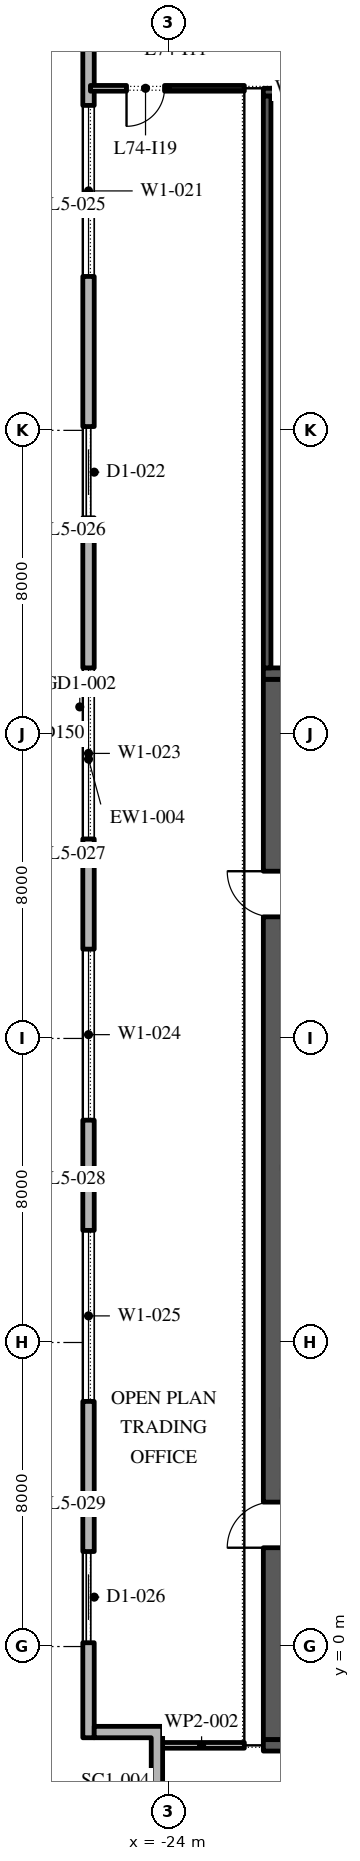
"""IFC4 building model, lengths in metres.
Left out: names, types, materials, properties, quantities, classifications, styles, units other than length and angle.
Written with IfcOpenShell. Run it as: python <this file> out.ifc"""

import sys

from ifc_helpers import new_model, si_unit, direction, frame, frame_2d, origin, place, context, subcontext, project, spatial, polyline, rectangle, outline, extrude, element, fill, save


model = new_model("IFC4")
c1 = context("Model", 3, precision=1e-05, world=origin(), true_north=direction((0.0, 1.0)))
c2 = subcontext(c1, "Body", "Model", "MODEL_VIEW")
j1 = project(units=[si_unit("LENGTHUNIT", "METRE"), si_unit("PLANEANGLEUNIT", "RADIAN")], contexts=[c1])
p1 = place(None, origin())
s1 = spatial("IfcSite", under=j1, at=p1, CompositionType="ELEMENT")
p2 = place(p1, origin())
s2 = spatial("IfcBuilding", under=s1, at=p2, CompositionType="ELEMENT")
p3 = place(p2, frame((0.0, 0.0, 338.4)))
s3 = spatial("IfcBuildingStorey", under=s2, at=p3, CompositionType="ELEMENT", Elevation=338.4)
p4 = place(p3, frame((-26.1, 49.1, 0.0), z_axis=(0.0, 0.0, 1.0), x_axis=(0.0, -1.0, 0.0)))
e1 = element("IfcWall", 1, at=p4, inside=s3, PredefinedType="STANDARD", context=c2, shape_type="SweptSolid", body=[
    extrude(rectangle(XDim=51.5, YDim=0.3, at=frame_2d((25.75, 0.0))), origin(), (0.0, 0.0, 1.0), 4.0),
])
p5 = place(p4, frame((1.3, 0.0, 0.45)))
e2 = element("IfcOpeningElement", 2, at=p5, cuts=e1, PredefinedType="OPENING", context=c2, shape_type="SweptSolid", body=[
    extrude(rectangle(XDim=4.5, YDim=3.05, at=frame_2d((2.25, 1.525))), frame((0.0, 0.16, 0.0), z_axis=(0.0, -1.0, 0.0), x_axis=(1.0, 0.0, 0.0)), (0.0, 0.0, 1.0), 0.32),
])
p6 = place(p4, frame((8.55, 0.0, 0.45)))
e3 = element("IfcOpeningElement", 3, at=p6, cuts=e1, PredefinedType="OPENING", context=c2, shape_type="SweptSolid", body=[
    extrude(rectangle(XDim=4.5, YDim=3.05, at=frame_2d((2.25, 1.525))), frame((0.0, 0.16, 0.0), z_axis=(0.0, -1.0, 0.0), x_axis=(1.0, 0.0, 0.0)), (0.0, 0.0, 1.0), 0.32),
])
p7 = place(p4, frame((17.0, 0.0, 0.0)))
e4 = element("IfcOpeningElement", 4, at=p7, cuts=e1, PredefinedType="OPENING", context=c2, shape_type="SweptSolid", body=[
    extrude(rectangle(XDim=2.4, YDim=3.5, at=frame_2d((1.2, 1.75))), frame((0.0, 0.16, 0.0), z_axis=(0.0, -1.0, 0.0), x_axis=(1.0, 0.0, 0.0)), (0.0, 0.0, 1.0), 0.32),
])
p8 = place(p4, frame((23.35, 0.0, 0.45)))
e5 = element("IfcOpeningElement", 5, at=p8, cuts=e1, PredefinedType="OPENING", context=c2, shape_type="SweptSolid", body=[
    extrude(rectangle(XDim=4.5, YDim=3.05, at=frame_2d((2.25, 1.525))), frame((0.0, 0.16, 0.0), z_axis=(0.0, -1.0, 0.0), x_axis=(1.0, 0.0, 0.0)), (0.0, 0.0, 1.0), 0.32),
])
p9 = place(p4, frame((30.75, 0.0, 0.45)))
e6 = element("IfcOpeningElement", 6, at=p9, cuts=e1, PredefinedType="OPENING", context=c2, shape_type="SweptSolid", body=[
    extrude(rectangle(XDim=4.5, YDim=3.05, at=frame_2d((2.25, 1.525))), frame((0.0, 0.16, 0.0), z_axis=(0.0, -1.0, 0.0), x_axis=(1.0, 0.0, 0.0)), (0.0, 0.0, 1.0), 0.32),
])
p10 = place(p4, frame((38.15, 0.0, 0.45)))
e7 = element("IfcOpeningElement", 7, at=p10, cuts=e1, PredefinedType="OPENING", context=c2, shape_type="SweptSolid", body=[
    extrude(rectangle(XDim=4.5, YDim=3.05, at=frame_2d((2.25, 1.525))), frame((0.0, 0.16, 0.0), z_axis=(0.0, -1.0, 0.0), x_axis=(1.0, 0.0, 0.0)), (0.0, 0.0, 1.0), 0.32),
])
p11 = place(p4, frame((46.6, 0.0, 0.0)))
e8 = element("IfcOpeningElement", 8, at=p11, cuts=e1, PredefinedType="OPENING", context=c2, shape_type="SweptSolid", body=[
    extrude(rectangle(XDim=2.4, YDim=3.5, at=frame_2d((1.2, 1.75))), frame((0.0, 0.16, 0.0), z_axis=(0.0, -1.0, 0.0), x_axis=(1.0, 0.0, 0.0)), (0.0, 0.0, 1.0), 0.32),
])
p12 = place(p3, origin())
e9 = element("IfcWall", 9, at=p12, inside=s3, PredefinedType="STANDARD", context=c2, shape_type="SweptSolid", body=[
    extrude(outline(polyline([(-22.65, -4.2), (-24.45, -4.2), (-24.45, -2.4), (-25.95, -2.4), (-25.95, -2.1), (-24.15, -2.1), (-24.15, -3.9), (-22.35, -3.9), (-22.35, -6.0), (-22.65, -6.0), (-22.65, -4.2)])), origin(), (0.0, 0.0, 1.0), 4.0),
])
p13 = place(p3, frame((-21.25, -2.45, 0.0), z_axis=(0.0, 0.0, 1.0), x_axis=(0.0, 1.0, 0.0)))
e10 = element("IfcWall", 10, at=p13, inside=s3, PredefinedType="SHEAR", context=c2, shape_type="SweptSolid", body=[
    extrude(rectangle(XDim=27.9, YDim=0.5, at=frame_2d((13.95, 0.0))), origin(), (0.0, 0.0, 1.0), 4.0),
])
p14 = place(p13, frame((5.05, 0.0, 0.0)))
e11 = element("IfcOpeningElement", 11, at=p14, cuts=e10, PredefinedType="OPENING", context=c2, shape_type="SweptSolid", body=[
    extrude(rectangle(XDim=1.2, YDim=2.1, at=frame_2d((0.6, 1.05))), frame((0.0, 0.26, 0.0), z_axis=(0.0, -1.0, 0.0), x_axis=(1.0, 0.0, 0.0)), (0.0, 0.0, 1.0), 0.52),
])
p15 = place(p13, frame((21.65, 0.0, 0.0)))
e12 = element("IfcOpeningElement", 12, at=p15, cuts=e10, PredefinedType="OPENING", context=c2, shape_type="SweptSolid", body=[
    extrude(rectangle(XDim=1.2, YDim=2.1, at=frame_2d((0.6, 1.05))), frame((0.0, 0.26, 0.0), z_axis=(0.0, -1.0, 0.0), x_axis=(1.0, 0.0, 0.0)), (0.0, 0.0, 1.0), 0.52),
])
for number, where, z_axis, x_axis in (
    (13, (-21.5, -2.6, 0.0), (0.0, 0.0, 1.0), (1.0, 0.0, 0.0)),
    (14, (-21.5, 25.6, 0.0), (0.0, 0.0, 1.0), (1.0, 0.0, 0.0)),
):
    element("IfcWall", number, at=place(p3, frame(where, z_axis=z_axis, x_axis=x_axis)), inside=s3, PredefinedType="SHEAR", context=c2, shape_type="SweptSolid", body=[
        extrude(rectangle(XDim=11.0, YDim=0.3, at=frame_2d((5.5, 0.0))), origin(), (0.0, 0.0, 1.0), 4.0),
    ])
p16 = place(p3, frame((-21.4, 25.75, 0.0), z_axis=(0.0, 0.0, 1.0), x_axis=(0.0, 1.0, 0.0)))
e15 = element("IfcWall", 15, at=p16, inside=s3, PredefinedType="SHEAR", context=c2, shape_type="SweptSolid", body=[
    extrude(rectangle(XDim=15.05, YDim=0.2, at=frame_2d((7.525, 0.0))), origin(), (0.0, 0.0, 1.0), 4.0),
])
p17 = place(p3, frame((-21.5, 40.9, 0.0), z_axis=(0.0, 0.0, 1.0), x_axis=(1.0, 0.0, 0.0)))
e16 = element("IfcWall", 16, at=p17, inside=s3, PredefinedType="SHEAR", context=c2, shape_type="SweptSolid", body=[
    extrude(rectangle(XDim=11.0, YDim=0.2, at=frame_2d((5.5, 0.0))), origin(), (0.0, 0.0, 1.0), 4.0),
])
p18 = place(p3, frame((-24.25, -2.6, 0.0), z_axis=(0.0, 0.0, 1.0), x_axis=(1.0, 0.0, 0.0)))
e17 = element("IfcWall", 17, at=p18, inside=s3, PredefinedType="PARTITIONING", context=c2, shape_type="SweptSolid", body=[
    extrude(rectangle(XDim=2.25, YDim=0.15, at=frame_2d((1.125, 0.0))), origin(), (0.0, 0.0, 1.0), 4.0),
])
p19 = place(p3, frame((-22.0, 41.0, 0.0), z_axis=(0.0, 0.0, 1.0), x_axis=(-1.0, 0.0, 0.0)))
e18 = element("IfcWall", 18, at=p19, inside=s3, PredefinedType="PARTITIONING", context=c2, shape_type="SweptSolid", body=[
    extrude(rectangle(XDim=4.05, YDim=0.15, at=frame_2d((2.025, 0.0))), origin(), (0.0, 0.0, 1.0), 4.0),
])
p20 = place(p19, frame((2.1, 0.0, 0.0)))
e19 = element("IfcOpeningElement", 19, at=p20, cuts=e18, PredefinedType="OPENING", context=c2, shape_type="SweptSolid", body=[
    extrude(rectangle(XDim=1.0, YDim=2.1, at=frame_2d((0.5, 1.05))), frame((0.0, 0.085, 0.0), z_axis=(0.0, -1.0, 0.0), x_axis=(1.0, 0.0, 0.0)), (0.0, 0.0, 1.0), 0.17),
])
p21 = place(p6, origin())
e20 = element("IfcWindow", 20, at=p21, inside=s3, PartitioningType="DOUBLE_PANEL_VERTICAL", PredefinedType="WINDOW", context=c2, shape_type="SweptSolid", body=[
    extrude(rectangle(XDim=4.5, YDim=3.05, at=frame_2d((2.25, 1.525))), frame((0.0, 0.03, 0.0), z_axis=(0.0, -1.0, 0.0), x_axis=(1.0, 0.0, 0.0)), (0.0, 0.0, 1.0), 0.06),
])
fill(e3, e20)
p22 = place(p7, origin())
e21 = element("IfcDoor", 21, at=p22, inside=s3, OperationType="DOUBLE_DOOR_SLIDING", PredefinedType="DOOR", context=c2, shape_type="SweptSolid", body=[
    extrude(rectangle(XDim=2.4, YDim=3.5, at=frame_2d((1.2, 1.75))), frame((0.0, 0.025, 0.0), z_axis=(0.0, -1.0, 0.0), x_axis=(1.0, 0.0, 0.0)), (0.0, 0.0, 1.0), 0.05),
])
fill(e4, e21)
p23 = place(p8, origin())
e22 = element("IfcWindow", 22, at=p23, inside=s3, PartitioningType="DOUBLE_PANEL_VERTICAL", PredefinedType="WINDOW", context=c2, shape_type="SweptSolid", body=[
    extrude(rectangle(XDim=4.5, YDim=3.05, at=frame_2d((2.25, 1.525))), frame((0.0, 0.03, 0.0), z_axis=(0.0, -1.0, 0.0), x_axis=(1.0, 0.0, 0.0)), (0.0, 0.0, 1.0), 0.06),
])
fill(e5, e22)
p24 = place(p9, origin())
e23 = element("IfcWindow", 23, at=p24, inside=s3, PartitioningType="DOUBLE_PANEL_VERTICAL", PredefinedType="WINDOW", context=c2, shape_type="SweptSolid", body=[
    extrude(rectangle(XDim=4.5, YDim=3.05, at=frame_2d((2.25, 1.525))), frame((0.0, 0.03, 0.0), z_axis=(0.0, -1.0, 0.0), x_axis=(1.0, 0.0, 0.0)), (0.0, 0.0, 1.0), 0.06),
])
fill(e6, e23)
p25 = place(p10, origin())
e24 = element("IfcWindow", 24, at=p25, inside=s3, PartitioningType="DOUBLE_PANEL_VERTICAL", PredefinedType="WINDOW", context=c2, shape_type="SweptSolid", body=[
    extrude(rectangle(XDim=4.5, YDim=3.05, at=frame_2d((2.25, 1.525))), frame((0.0, 0.03, 0.0), z_axis=(0.0, -1.0, 0.0), x_axis=(1.0, 0.0, 0.0)), (0.0, 0.0, 1.0), 0.06),
])
fill(e7, e24)
p26 = place(p11, origin())
e25 = element("IfcDoor", 25, at=p26, inside=s3, OperationType="DOUBLE_DOOR_SLIDING", PredefinedType="DOOR", context=c2, shape_type="SweptSolid", body=[
    extrude(rectangle(XDim=2.4, YDim=3.5, at=frame_2d((1.2, 1.75))), frame((0.0, 0.025, 0.0), z_axis=(0.0, -1.0, 0.0), x_axis=(1.0, 0.0, 0.0)), (0.0, 0.0, 1.0), 0.05),
])
fill(e8, e25)
p27 = place(p14, origin())
e26 = element("IfcDoor", 26, at=p27, inside=s3, OperationType="SINGLE_SWING_RIGHT", PredefinedType="DOOR", context=c2, shape_type="SweptSolid", body=[
    extrude(rectangle(XDim=1.2, YDim=2.1, at=frame_2d((0.6, 1.05))), frame((0.0, 0.025, 0.0), z_axis=(0.0, -1.0, 0.0), x_axis=(1.0, 0.0, 0.0)), (0.0, 0.0, 1.0), 0.05),
])
fill(e11, e26)
p28 = place(p15, origin())
e27 = element("IfcDoor", 27, at=p28, inside=s3, OperationType="SINGLE_SWING_LEFT", PredefinedType="DOOR", context=c2, shape_type="SweptSolid", body=[
    extrude(rectangle(XDim=1.2, YDim=2.1, at=frame_2d((0.6, 1.05))), frame((0.0, 0.025, 0.0), z_axis=(0.0, -1.0, 0.0), x_axis=(1.0, 0.0, 0.0)), (0.0, 0.0, 1.0), 0.05),
])
fill(e12, e27)
p29 = place(p20, origin())
e28 = element("IfcDoor", 28, at=p29, inside=s3, OperationType="SINGLE_SWING_LEFT", PredefinedType="DOOR", context=c2, shape_type="SweptSolid", body=[
    extrude(rectangle(XDim=1.0, YDim=2.1, at=frame_2d((0.5, 1.05))), frame((0.0, 0.025, 0.0), z_axis=(0.0, -1.0, 0.0), x_axis=(1.0, 0.0, 0.0)), (0.0, 0.0, 1.0), 0.05),
])
fill(e19, e28)
save(model, sys.argv[1])
